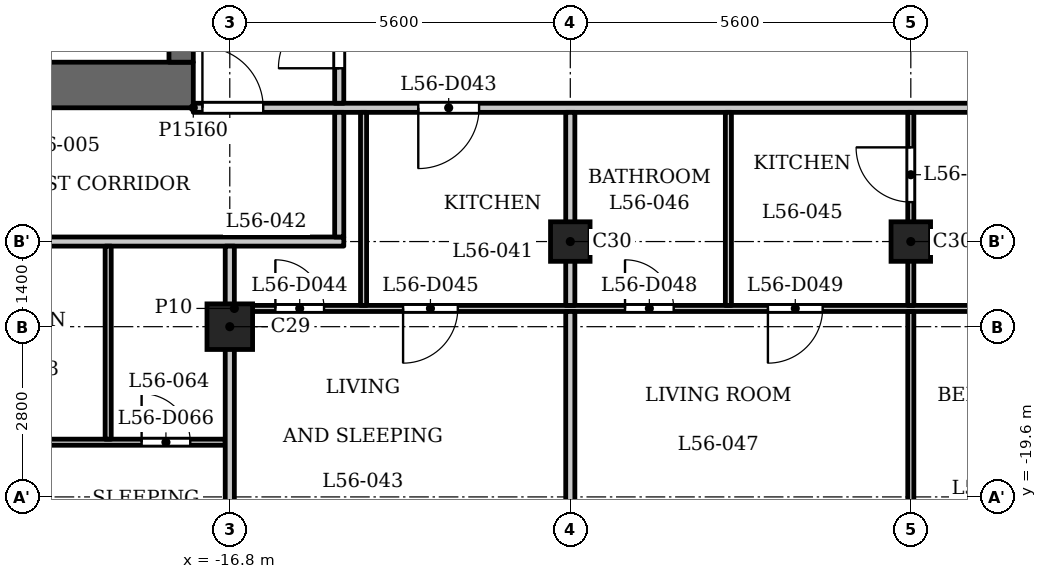
"""IFC4 building model, lengths in metres.
Left out: names, types, materials, properties, quantities, classifications, styles, units other than length and angle.
Written with IfcOpenShell. Run it as: python <this file> out.ifc"""

import sys

from ifc_helpers import new_model, si_unit, direction, frame, frame_2d, origin, origin_2d, place, context, subcontext, project, spatial, rectangle, extrude, element, fill, save


model = new_model("IFC4")
c1 = context("Model", 3, precision=1e-05, world=origin(), true_north=direction((0.0, 1.0)))
c2 = subcontext(c1, "Body", "Model", "MODEL_VIEW")
j1 = project(units=[si_unit("LENGTHUNIT", "METRE"), si_unit("PLANEANGLEUNIT", "RADIAN")], contexts=[c1])
p1 = place(None, origin())
s1 = spatial("IfcSite", under=j1, at=p1, CompositionType="ELEMENT")
p2 = place(p1, origin())
s2 = spatial("IfcBuilding", under=s1, at=p2, CompositionType="ELEMENT")
p3 = place(p2, frame((0.0, 0.0, 216.9)))
s3 = spatial("IfcBuildingStorey", under=s2, at=p3, CompositionType="ELEMENT", Elevation=216.9)
p4 = place(p3, frame((-16.8, -16.8, 0.0), z_axis=(0.0, 0.0, 1.0), x_axis=(1.0, 0.0, 0.0)))
e1 = element("IfcColumn", 1, at=p4, inside=s3, PredefinedType="COLUMN", context=c2, shape_type="SweptSolid", body=[
    extrude(rectangle(XDim=0.75, YDim=0.75, at=origin_2d()), origin(), (0.0, 0.0, 1.0), 3.5),
])
for number, where, z_axis, x_axis in (
    (2, (-11.2, -15.4, 0.0), (0.0, 0.0, 1.0), (1.0, 0.0, 0.0)),
    (3, (-5.6, -15.4, 0.0), (0.0, 0.0, 1.0), (1.0, 0.0, 0.0)),
):
    element("IfcColumn", number, at=place(p3, frame(where, z_axis=z_axis, x_axis=x_axis)), inside=s3, PredefinedType="COLUMN", context=c2, shape_type="SweptSolid", body=[
        extrude(rectangle(XDim=0.65, YDim=0.65, at=origin_2d()), origin(), (0.0, 0.0, 1.0), 3.5),
    ])
p5 = place(p3, frame((-17.4, -12.825, 0.0), z_axis=(0.0, 0.0, 1.0), x_axis=(-1.0, 0.0, 0.0)))
e4 = element("IfcWall", 4, at=p5, inside=s3, PredefinedType="SHEAR", context=c2, shape_type="SweptSolid", body=[
    extrude(rectangle(XDim=7.6, YDim=0.75, at=frame_2d((3.8, 0.0))), origin(), (0.0, 0.0, 1.0), 3.2),
])
p6 = place(p3, frame((-17.6, -12.45, 0.0), z_axis=(0.0, 0.0, 1.0), x_axis=(0.0, 1.0, 0.0)))
e5 = element("IfcWall", 5, at=p6, inside=s3, PredefinedType="SHEAR", context=c2, shape_type="SweptSolid", body=[
    extrude(rectangle(XDim=24.9, YDim=0.4, at=frame_2d((12.45, 0.0))), origin(), (0.0, 0.0, 1.0), 3.2),
])
p7 = place(p6, frame((6.85, 0.0, 0.0)))
e6 = element("IfcOpeningElement", 6, at=p7, cuts=e5, PredefinedType="OPENING", context=c2, shape_type="SweptSolid", body=[
    extrude(rectangle(XDim=0.9, YDim=2.1, at=frame_2d((0.45, 1.05))), frame((0.0, 0.21, 0.0), z_axis=(0.0, -1.0, 0.0), x_axis=(1.0, 0.0, 0.0)), (0.0, 0.0, 1.0), 0.42),
])
p8 = place(p6, frame((10.45, 0.0, 0.0)))
e7 = element("IfcOpeningElement", 7, at=p8, cuts=e5, PredefinedType="OPENING", context=c2, shape_type="SweptSolid", body=[
    extrude(rectangle(XDim=0.9, YDim=2.1, at=frame_2d((0.45, 1.05))), frame((0.0, 0.21, 0.0), z_axis=(0.0, -1.0, 0.0), x_axis=(1.0, 0.0, 0.0)), (0.0, 0.0, 1.0), 0.42),
])
p9 = place(p6, frame((15.6, 0.0, 0.0)))
e8 = element("IfcOpeningElement", 8, at=p9, cuts=e5, PredefinedType="OPENING", context=c2, shape_type="SweptSolid", body=[
    extrude(rectangle(XDim=1.1, YDim=2.1, at=frame_2d((0.55, 1.05))), frame((0.0, 0.21, 0.0), z_axis=(0.0, -1.0, 0.0), x_axis=(1.0, 0.0, 0.0)), (0.0, 0.0, 1.0), 0.42),
])
p10 = place(p6, frame((18.0, 0.0, 0.0)))
e9 = element("IfcOpeningElement", 9, at=p10, cuts=e5, PredefinedType="OPENING", context=c2, shape_type="SweptSolid", body=[
    extrude(rectangle(XDim=1.1, YDim=2.1, at=frame_2d((0.55, 1.05))), frame((0.0, 0.21, 0.0), z_axis=(0.0, -1.0, 0.0), x_axis=(1.0, 0.0, 0.0)), (0.0, 0.0, 1.0), 0.42),
])
p11 = place(p6, frame((23.025, 0.0, 0.0)))
e10 = element("IfcOpeningElement", 10, at=p11, cuts=e5, PredefinedType="OPENING", context=c2, shape_type="SweptSolid", body=[
    extrude(rectangle(XDim=1.1, YDim=2.1, at=frame_2d((0.55, 1.05))), frame((0.0, 0.21, 0.0), z_axis=(0.0, -1.0, 0.0), x_axis=(1.0, 0.0, 0.0)), (0.0, 0.0, 1.0), 0.42),
])
p12 = place(p6, frame((0.775, 0.0, 0.0)))
e11 = element("IfcOpeningElement", 11, at=p12, cuts=e5, PredefinedType="OPENING", context=c2, shape_type="SweptSolid", body=[
    extrude(rectangle(XDim=1.1, YDim=2.1, at=frame_2d((0.55, 1.05))), frame((0.0, 0.21, 0.0), z_axis=(0.0, -1.0, 0.0), x_axis=(1.0, 0.0, 0.0)), (0.0, 0.0, 1.0), 0.42),
])
p13 = place(p6, frame((12.925, 0.0, 0.0)))
e12 = element("IfcOpeningElement", 12, at=p13, cuts=e5, PredefinedType="OPENING", context=c2, shape_type="SweptSolid", body=[
    extrude(rectangle(XDim=1.8, YDim=2.1, at=frame_2d((0.9, 1.05))), frame((0.0, 0.21, 0.0), z_axis=(0.0, -1.0, 0.0), x_axis=(1.0, 0.0, 0.0)), (0.0, 0.0, 1.0), 0.42),
])
p14 = place(p3, frame((-22.856, -18.7, 0.0), z_axis=(0.0, 0.0, 1.0), x_axis=(1.0, 0.0, 0.0)))
e13 = element("IfcWall", 13, at=p14, inside=s3, PredefinedType="PARTITIONING", context=c2, shape_type="SweptSolid", body=[
    extrude(rectangle(XDim=5.981, YDim=0.1, at=frame_2d((2.99, 0.0))), origin(), (0.0, 0.0, 1.0), 3.2),
])
p15 = place(p14, frame((4.606, 0.0, 0.0)))
e14 = element("IfcOpeningElement", 14, at=p15, cuts=e13, PredefinedType="OPENING", context=c2, shape_type="SweptSolid", body=[
    extrude(rectangle(XDim=0.8, YDim=2.1, at=frame_2d((0.4, 1.05))), frame((0.0, 0.06, 0.0), z_axis=(0.0, -1.0, 0.0), x_axis=(1.0, 0.0, 0.0)), (0.0, 0.0, 1.0), 0.12),
])
p16 = place(p14, frame((1.084, 0.0, 0.0)))
e15 = element("IfcOpeningElement", 15, at=p16, cuts=e13, PredefinedType="OPENING", context=c2, shape_type="SweptSolid", body=[
    extrude(rectangle(XDim=0.9, YDim=2.1, at=frame_2d((0.45, 1.05))), frame((0.0, 0.06, 0.0), z_axis=(0.0, -1.0, 0.0), x_axis=(1.0, 0.0, 0.0)), (0.0, 0.0, 1.0), 0.12),
])
p17 = place(p3, frame((-16.725, -16.5, 0.0), z_axis=(0.0, 0.0, 1.0), x_axis=(1.0, 0.0, 0.0)))
e16 = element("IfcWall", 16, at=p17, inside=s3, PredefinedType="PARTITIONING", context=c2, shape_type="SweptSolid", body=[
    extrude(rectangle(XDim=33.45, YDim=0.1, at=frame_2d((16.725, 0.0))), origin(), (0.0, 0.0, 1.0), 3.2),
])
p18 = place(p17, frame((0.675, 0.0, 0.0)))
e17 = element("IfcOpeningElement", 17, at=p18, cuts=e16, PredefinedType="OPENING", context=c2, shape_type="SweptSolid", body=[
    extrude(rectangle(XDim=0.8, YDim=2.1, at=frame_2d((0.4, 1.05))), frame((0.0, 0.06, 0.0), z_axis=(0.0, -1.0, 0.0), x_axis=(1.0, 0.0, 0.0)), (0.0, 0.0, 1.0), 0.12),
])
p19 = place(p17, frame((2.775, 0.0, 0.0)))
e18 = element("IfcOpeningElement", 18, at=p19, cuts=e16, PredefinedType="OPENING", context=c2, shape_type="SweptSolid", body=[
    extrude(rectangle(XDim=0.9, YDim=2.1, at=frame_2d((0.45, 1.05))), frame((0.0, 0.06, 0.0), z_axis=(0.0, -1.0, 0.0), x_axis=(1.0, 0.0, 0.0)), (0.0, 0.0, 1.0), 0.12),
])
p20 = place(p17, frame((6.425, 0.0, 0.0)))
e19 = element("IfcOpeningElement", 19, at=p20, cuts=e16, PredefinedType="OPENING", context=c2, shape_type="SweptSolid", body=[
    extrude(rectangle(XDim=0.8, YDim=2.1, at=frame_2d((0.4, 1.05))), frame((0.0, 0.06, 0.0), z_axis=(0.0, -1.0, 0.0), x_axis=(1.0, 0.0, 0.0)), (0.0, 0.0, 1.0), 0.12),
])
p21 = place(p17, frame((8.775, 0.0, 0.0)))
e20 = element("IfcOpeningElement", 20, at=p21, cuts=e16, PredefinedType="OPENING", context=c2, shape_type="SweptSolid", body=[
    extrude(rectangle(XDim=0.9, YDim=2.1, at=frame_2d((0.45, 1.05))), frame((0.0, 0.06, 0.0), z_axis=(0.0, -1.0, 0.0), x_axis=(1.0, 0.0, 0.0)), (0.0, 0.0, 1.0), 0.12),
])
p22 = place(p17, frame((12.525, 0.0, 0.0)))
e21 = element("IfcOpeningElement", 21, at=p22, cuts=e16, PredefinedType="OPENING", context=c2, shape_type="SweptSolid", body=[
    extrude(rectangle(XDim=0.9, YDim=2.1, at=frame_2d((0.45, 1.05))), frame((0.0, 0.06, 0.0), z_axis=(0.0, -1.0, 0.0), x_axis=(1.0, 0.0, 0.0)), (0.0, 0.0, 1.0), 0.12),
])
p23 = place(p17, frame((14.775, 0.0, 0.0)))
e22 = element("IfcOpeningElement", 22, at=p23, cuts=e16, PredefinedType="OPENING", context=c2, shape_type="SweptSolid", body=[
    extrude(rectangle(XDim=0.9, YDim=2.1, at=frame_2d((0.45, 1.05))), frame((0.0, 0.06, 0.0), z_axis=(0.0, -1.0, 0.0), x_axis=(1.0, 0.0, 0.0)), (0.0, 0.0, 1.0), 0.12),
])
p24 = place(p17, frame((25.475, 0.0, 0.0)))
e23 = element("IfcOpeningElement", 23, at=p24, cuts=e16, PredefinedType="OPENING", context=c2, shape_type="SweptSolid", body=[
    extrude(rectangle(XDim=0.8, YDim=2.1, at=frame_2d((0.4, 1.05))), frame((0.0, 0.06, 0.0), z_axis=(0.0, -1.0, 0.0), x_axis=(1.0, 0.0, 0.0)), (0.0, 0.0, 1.0), 0.12),
])
p25 = place(p17, frame((23.225, 0.0, 0.0)))
e24 = element("IfcOpeningElement", 24, at=p25, cuts=e16, PredefinedType="OPENING", context=c2, shape_type="SweptSolid", body=[
    extrude(rectangle(XDim=0.9, YDim=2.1, at=frame_2d((0.45, 1.05))), frame((0.0, 0.06, 0.0), z_axis=(0.0, -1.0, 0.0), x_axis=(1.0, 0.0, 0.0)), (0.0, 0.0, 1.0), 0.12),
])
p26 = place(p17, frame((17.875, 0.0, 0.0)))
e25 = element("IfcOpeningElement", 25, at=p26, cuts=e16, PredefinedType="OPENING", context=c2, shape_type="SweptSolid", body=[
    extrude(rectangle(XDim=0.9, YDim=2.1, at=frame_2d((0.45, 1.05))), frame((0.0, 0.06, 0.0), z_axis=(0.0, -1.0, 0.0), x_axis=(1.0, 0.0, 0.0)), (0.0, 0.0, 1.0), 0.12),
])
p27 = place(p17, frame((19.975, 0.0, 0.0)))
e26 = element("IfcOpeningElement", 26, at=p27, cuts=e16, PredefinedType="OPENING", context=c2, shape_type="SweptSolid", body=[
    extrude(rectangle(XDim=0.9, YDim=2.1, at=frame_2d((0.45, 1.05))), frame((0.0, 0.06, 0.0), z_axis=(0.0, -1.0, 0.0), x_axis=(1.0, 0.0, 0.0)), (0.0, 0.0, 1.0), 0.12),
])
p28 = place(p17, frame((30.825, 0.0, 0.0)))
e27 = element("IfcOpeningElement", 27, at=p28, cuts=e16, PredefinedType="OPENING", context=c2, shape_type="SweptSolid", body=[
    extrude(rectangle(XDim=0.8, YDim=2.1, at=frame_2d((0.4, 1.05))), frame((0.0, 0.06, 0.0), z_axis=(0.0, -1.0, 0.0), x_axis=(1.0, 0.0, 0.0)), (0.0, 0.0, 1.0), 0.12),
])
p29 = place(p17, frame((29.075, 0.0, 0.0)))
e28 = element("IfcOpeningElement", 28, at=p29, cuts=e16, PredefinedType="OPENING", context=c2, shape_type="SweptSolid", body=[
    extrude(rectangle(XDim=0.9, YDim=2.1, at=frame_2d((0.45, 1.05))), frame((0.0, 0.06, 0.0), z_axis=(0.0, -1.0, 0.0), x_axis=(1.0, 0.0, 0.0)), (0.0, 0.0, 1.0), 0.12),
])
p30 = place(p3, frame((-24.684, -15.4, 0.0), z_axis=(0.0, 0.0, 1.0), x_axis=(1.0, 0.0, 0.0)))
e29 = element("IfcWall", 29, at=p30, inside=s3, PredefinedType="PARTITIONING", context=c2, shape_type="SweptSolid", body=[
    extrude(rectangle(XDim=9.759, YDim=0.15, at=frame_2d((4.879, 0.0))), origin(), (0.0, 0.0, 1.0), 3.2),
])
p31 = place(p30, frame((1.143, 0.0, 0.0)))
e30 = element("IfcOpeningElement", 30, at=p31, cuts=e29, PredefinedType="OPENING", context=c2, shape_type="SweptSolid", body=[
    extrude(rectangle(XDim=1.0, YDim=2.1, at=frame_2d((0.5, 1.05))), frame((0.0, 0.085, 0.0), z_axis=(0.0, -1.0, 0.0), x_axis=(1.0, 0.0, 0.0)), (0.0, 0.0, 1.0), 0.17),
])
p32 = place(p3, frame((-17.4, -13.2, 0.0), z_axis=(0.0, 0.0, 1.0), x_axis=(1.0, 0.0, 0.0)))
e31 = element("IfcWall", 31, at=p32, inside=s3, PredefinedType="PARTITIONING", context=c2, shape_type="SweptSolid", body=[
    extrude(rectangle(XDim=34.8, YDim=0.15, at=frame_2d((17.4, 0.0))), origin(), (0.0, 0.0, 1.0), 3.2),
])
p33 = place(p32, frame((0.15, 0.0, 0.0)))
e32 = element("IfcOpeningElement", 32, at=p33, cuts=e31, PredefinedType="OPENING", context=c2, shape_type="SweptSolid", body=[
    extrude(rectangle(XDim=1.0, YDim=2.1, at=frame_2d((0.5, 1.05))), frame((0.0, 0.085, 0.0), z_axis=(0.0, -1.0, 0.0), x_axis=(1.0, 0.0, 0.0)), (0.0, 0.0, 1.0), 0.17),
])
p34 = place(p32, frame((33.55, 0.0, 0.0)))
e33 = element("IfcOpeningElement", 33, at=p34, cuts=e31, PredefinedType="OPENING", context=c2, shape_type="SweptSolid", body=[
    extrude(rectangle(XDim=1.0, YDim=2.1, at=frame_2d((0.5, 1.05))), frame((0.0, 0.085, 0.0), z_axis=(0.0, -1.0, 0.0), x_axis=(1.0, 0.0, 0.0)), (0.0, 0.0, 1.0), 0.17),
])
p35 = place(p32, frame((3.7, 0.0, 0.0)))
e34 = element("IfcOpeningElement", 34, at=p35, cuts=e31, PredefinedType="OPENING", context=c2, shape_type="SweptSolid", body=[
    extrude(rectangle(XDim=1.0, YDim=2.1, at=frame_2d((0.5, 1.05))), frame((0.0, 0.085, 0.0), z_axis=(0.0, -1.0, 0.0), x_axis=(1.0, 0.0, 0.0)), (0.0, 0.0, 1.0), 0.17),
])
p36 = place(p32, frame((15.7, 0.0, 0.0)))
e35 = element("IfcOpeningElement", 35, at=p36, cuts=e31, PredefinedType="OPENING", context=c2, shape_type="SweptSolid", body=[
    extrude(rectangle(XDim=1.0, YDim=2.1, at=frame_2d((0.5, 1.05))), frame((0.0, 0.085, 0.0), z_axis=(0.0, -1.0, 0.0), x_axis=(1.0, 0.0, 0.0)), (0.0, 0.0, 1.0), 0.17),
])
p37 = place(p32, frame((21.3, 0.0, 0.0)))
e36 = element("IfcOpeningElement", 36, at=p37, cuts=e31, PredefinedType="OPENING", context=c2, shape_type="SweptSolid", body=[
    extrude(rectangle(XDim=1.0, YDim=2.1, at=frame_2d((0.5, 1.05))), frame((0.0, 0.085, 0.0), z_axis=(0.0, -1.0, 0.0), x_axis=(1.0, 0.0, 0.0)), (0.0, 0.0, 1.0), 0.17),
])
p38 = place(p32, frame((29.5, 0.0, 0.0)))
e37 = element("IfcOpeningElement", 37, at=p38, cuts=e31, PredefinedType="OPENING", context=c2, shape_type="SweptSolid", body=[
    extrude(rectangle(XDim=1.0, YDim=2.1, at=frame_2d((0.5, 1.05))), frame((0.0, 0.085, 0.0), z_axis=(0.0, -1.0, 0.0), x_axis=(1.0, 0.0, 0.0)), (0.0, 0.0, 1.0), 0.17),
])
p39 = place(p3, frame((-18.8, -18.65, 0.0), z_axis=(0.0, 0.0, 1.0), x_axis=(0.0, 1.0, 0.0)))
e38 = element("IfcWall", 38, at=p39, inside=s3, PredefinedType="PARTITIONING", context=c2, shape_type="SweptSolid", body=[
    extrude(rectangle(XDim=3.175, YDim=0.1, at=frame_2d((1.587, 0.0))), origin(), (0.0, 0.0, 1.0), 3.2),
])
p40 = place(p3, frame((-16.8, -22.31, 0.0), z_axis=(0.0, 0.0, 1.0), x_axis=(0.0, 1.0, 0.0)))
e39 = element("IfcWall", 39, at=p40, inside=s3, PredefinedType="PARTITIONING", context=c2, shape_type="SweptSolid", body=[
    extrude(rectangle(XDim=6.835, YDim=0.15, at=frame_2d((3.417, 0.0))), origin(), (0.0, 0.0, 1.0), 2.55),
])
p41 = place(p3, frame((-15.0, -15.325, 0.0), z_axis=(0.0, 0.0, 1.0), x_axis=(0.0, 1.0, 0.0)))
e40 = element("IfcWall", 40, at=p41, inside=s3, PredefinedType="PARTITIONING", context=c2, shape_type="SweptSolid", body=[
    extrude(rectangle(XDim=2.05, YDim=0.15, at=frame_2d((1.025, 0.0))), origin(), (0.0, 0.0, 1.0), 3.2),
])
p42 = place(p3, frame((-15.0, -13.125, 0.0), z_axis=(0.0, 0.0, 1.0), x_axis=(0.0, 1.0, 0.0)))
e41 = element("IfcWall", 41, at=p42, inside=s3, PredefinedType="PARTITIONING", context=c2, shape_type="SweptSolid", body=[
    extrude(rectangle(XDim=6.356, YDim=0.15, at=frame_2d((3.178, 0.0))), origin(), (0.0, 0.0, 1.0), 3.2),
])
p43 = place(p42, frame((0.575, 0.0, 0.0)))
e42 = element("IfcOpeningElement", 42, at=p43, cuts=e41, PredefinedType="OPENING", context=c2, shape_type="SweptSolid", body=[
    extrude(rectangle(XDim=1.0, YDim=2.1, at=frame_2d((0.5, 1.05))), frame((0.0, 0.085, 0.0), z_axis=(0.0, -1.0, 0.0), x_axis=(1.0, 0.0, 0.0)), (0.0, 0.0, 1.0), 0.17),
])
p44 = place(p3, frame((-14.6, -16.45, 0.0), z_axis=(0.0, 0.0, 1.0), x_axis=(0.0, 1.0, 0.0)))
e43 = element("IfcWall", 43, at=p44, inside=s3, PredefinedType="PARTITIONING", context=c2, shape_type="SweptSolid", body=[
    extrude(rectangle(XDim=3.175, YDim=0.1, at=frame_2d((1.587, 0.0))), origin(), (0.0, 0.0, 1.0), 3.2),
])
p45 = place(p3, frame((-11.2, -22.08, 0.0), z_axis=(0.0, 0.0, 1.0), x_axis=(0.0, 1.0, 0.0)))
e44 = element("IfcWall", 44, at=p45, inside=s3, PredefinedType="PARTITIONING", context=c2, shape_type="SweptSolid", body=[
    extrude(rectangle(XDim=5.53, YDim=0.15, at=frame_2d((2.765, 0.0))), origin(), (0.0, 0.0, 1.0), 3.2),
])
p46 = place(p3, frame((-11.2, -16.45, 0.0), z_axis=(0.0, 0.0, 1.0), x_axis=(0.0, 1.0, 0.0)))
e45 = element("IfcWall", 45, at=p46, inside=s3, PredefinedType="PARTITIONING", context=c2, shape_type="SweptSolid", body=[
    extrude(rectangle(XDim=3.175, YDim=0.15, at=frame_2d((1.587, 0.0))), origin(), (0.0, 0.0, 1.0), 3.2),
])
p47 = place(p3, frame((-8.6, -16.45, 0.0), z_axis=(0.0, 0.0, 1.0), x_axis=(0.0, 1.0, 0.0)))
e46 = element("IfcWall", 46, at=p47, inside=s3, PredefinedType="PARTITIONING", context=c2, shape_type="SweptSolid", body=[
    extrude(rectangle(XDim=3.175, YDim=0.1, at=frame_2d((1.587, 0.0))), origin(), (0.0, 0.0, 1.0), 3.2),
])
p48 = place(p3, frame((-5.6, -22.08, 0.0), z_axis=(0.0, 0.0, 1.0), x_axis=(0.0, 1.0, 0.0)))
e47 = element("IfcWall", 47, at=p48, inside=s3, PredefinedType="PARTITIONING", context=c2, shape_type="SweptSolid", body=[
    extrude(rectangle(XDim=5.53, YDim=0.1, at=frame_2d((2.765, 0.0))), origin(), (0.0, 0.0, 1.0), 3.2),
])
p49 = place(p3, frame((-5.6, -16.45, 0.0), z_axis=(0.0, 0.0, 1.0), x_axis=(0.0, 1.0, 0.0)))
e48 = element("IfcWall", 48, at=p49, inside=s3, PredefinedType="PARTITIONING", context=c2, shape_type="SweptSolid", body=[
    extrude(rectangle(XDim=3.175, YDim=0.1, at=frame_2d((1.587, 0.0))), origin(), (0.0, 0.0, 1.0), 3.2),
])
p50 = place(p49, frame((1.699, 0.0, 0.0)))
e49 = element("IfcOpeningElement", 49, at=p50, cuts=e48, PredefinedType="OPENING", context=c2, shape_type="SweptSolid", body=[
    extrude(rectangle(XDim=0.9, YDim=2.1, at=frame_2d((0.45, 1.05))), frame((0.0, 0.06, 0.0), z_axis=(0.0, -1.0, 0.0), x_axis=(1.0, 0.0, 0.0)), (0.0, 0.0, 1.0), 0.12),
])
p51 = place(p43, origin())
e50 = element("IfcDoor", 50, at=p51, inside=s3, OperationType="SINGLE_SWING_RIGHT", PredefinedType="DOOR", context=c2, shape_type="SweptSolid", body=[
    extrude(rectangle(XDim=1.0, YDim=2.1, at=frame_2d((0.5, 1.05))), frame((0.0, 0.025, 0.0), z_axis=(0.0, -1.0, 0.0), x_axis=(1.0, 0.0, 0.0)), (0.0, 0.0, 1.0), 0.05),
])
fill(e42, e50)
p52 = place(p33, origin())
e51 = element("IfcDoor", 51, at=p52, inside=s3, OperationType="SINGLE_SWING_RIGHT", PredefinedType="DOOR", context=c2, shape_type="SweptSolid", body=[
    extrude(rectangle(XDim=1.0, YDim=2.1, at=frame_2d((0.5, 1.05))), frame((0.0, 0.025, 0.0), z_axis=(0.0, -1.0, 0.0), x_axis=(1.0, 0.0, 0.0)), (0.0, 0.0, 1.0), 0.05),
])
fill(e32, e51)
p53 = place(p35, origin())
e52 = element("IfcDoor", 52, at=p53, inside=s3, OperationType="SINGLE_SWING_LEFT", PredefinedType="DOOR", context=c2, shape_type="SweptSolid", body=[
    extrude(rectangle(XDim=1.0, YDim=2.1, at=frame_2d((0.5, 1.05))), frame((0.0, 0.025, 0.0), z_axis=(0.0, -1.0, 0.0), x_axis=(1.0, 0.0, 0.0)), (0.0, 0.0, 1.0), 0.05),
])
fill(e34, e52)
p54 = place(p18, origin())
e53 = element("IfcDoor", 53, at=p54, inside=s3, OperationType="SINGLE_SWING_RIGHT", PredefinedType="DOOR", context=c2, shape_type="SweptSolid", body=[
    extrude(rectangle(XDim=0.8, YDim=2.1, at=frame_2d((0.4, 1.05))), frame((0.0, 0.025, 0.0), z_axis=(0.0, -1.0, 0.0), x_axis=(1.0, 0.0, 0.0)), (0.0, 0.0, 1.0), 0.05),
])
fill(e17, e53)
p55 = place(p19, origin())
e54 = element("IfcDoor", 54, at=p55, inside=s3, OperationType="SINGLE_SWING_LEFT", PredefinedType="DOOR", context=c2, shape_type="SweptSolid", body=[
    extrude(rectangle(XDim=0.9, YDim=2.1, at=frame_2d((0.45, 1.05))), frame((0.0, 0.025, 0.0), z_axis=(0.0, -1.0, 0.0), x_axis=(1.0, 0.0, 0.0)), (0.0, 0.0, 1.0), 0.05),
])
fill(e18, e54)
p56 = place(p50, origin())
e55 = element("IfcDoor", 55, at=p56, inside=s3, OperationType="SINGLE_SWING_LEFT", PredefinedType="DOOR", context=c2, shape_type="SweptSolid", body=[
    extrude(rectangle(XDim=0.9, YDim=2.1, at=frame_2d((0.45, 1.05))), frame((0.0, 0.025, 0.0), z_axis=(0.0, -1.0, 0.0), x_axis=(1.0, 0.0, 0.0)), (0.0, 0.0, 1.0), 0.05),
])
fill(e49, e55)
p57 = place(p20, origin())
e56 = element("IfcDoor", 56, at=p57, inside=s3, OperationType="SINGLE_SWING_RIGHT", PredefinedType="DOOR", context=c2, shape_type="SweptSolid", body=[
    extrude(rectangle(XDim=0.8, YDim=2.1, at=frame_2d((0.4, 1.05))), frame((0.0, 0.025, 0.0), z_axis=(0.0, -1.0, 0.0), x_axis=(1.0, 0.0, 0.0)), (0.0, 0.0, 1.0), 0.05),
])
fill(e19, e56)
p58 = place(p21, origin())
e57 = element("IfcDoor", 57, at=p58, inside=s3, OperationType="SINGLE_SWING_LEFT", PredefinedType="DOOR", context=c2, shape_type="SweptSolid", body=[
    extrude(rectangle(XDim=0.9, YDim=2.1, at=frame_2d((0.45, 1.05))), frame((0.0, 0.025, 0.0), z_axis=(0.0, -1.0, 0.0), x_axis=(1.0, 0.0, 0.0)), (0.0, 0.0, 1.0), 0.05),
])
fill(e20, e57)
p59 = place(p15, origin())
e58 = element("IfcDoor", 58, at=p59, inside=s3, OperationType="SINGLE_SWING_RIGHT", PredefinedType="DOOR", context=c2, shape_type="SweptSolid", body=[
    extrude(rectangle(XDim=0.8, YDim=2.1, at=frame_2d((0.4, 1.05))), frame((0.0, 0.025, 0.0), z_axis=(0.0, -1.0, 0.0), x_axis=(1.0, 0.0, 0.0)), (0.0, 0.0, 1.0), 0.05),
])
fill(e14, e58)
save(model, sys.argv[1])
